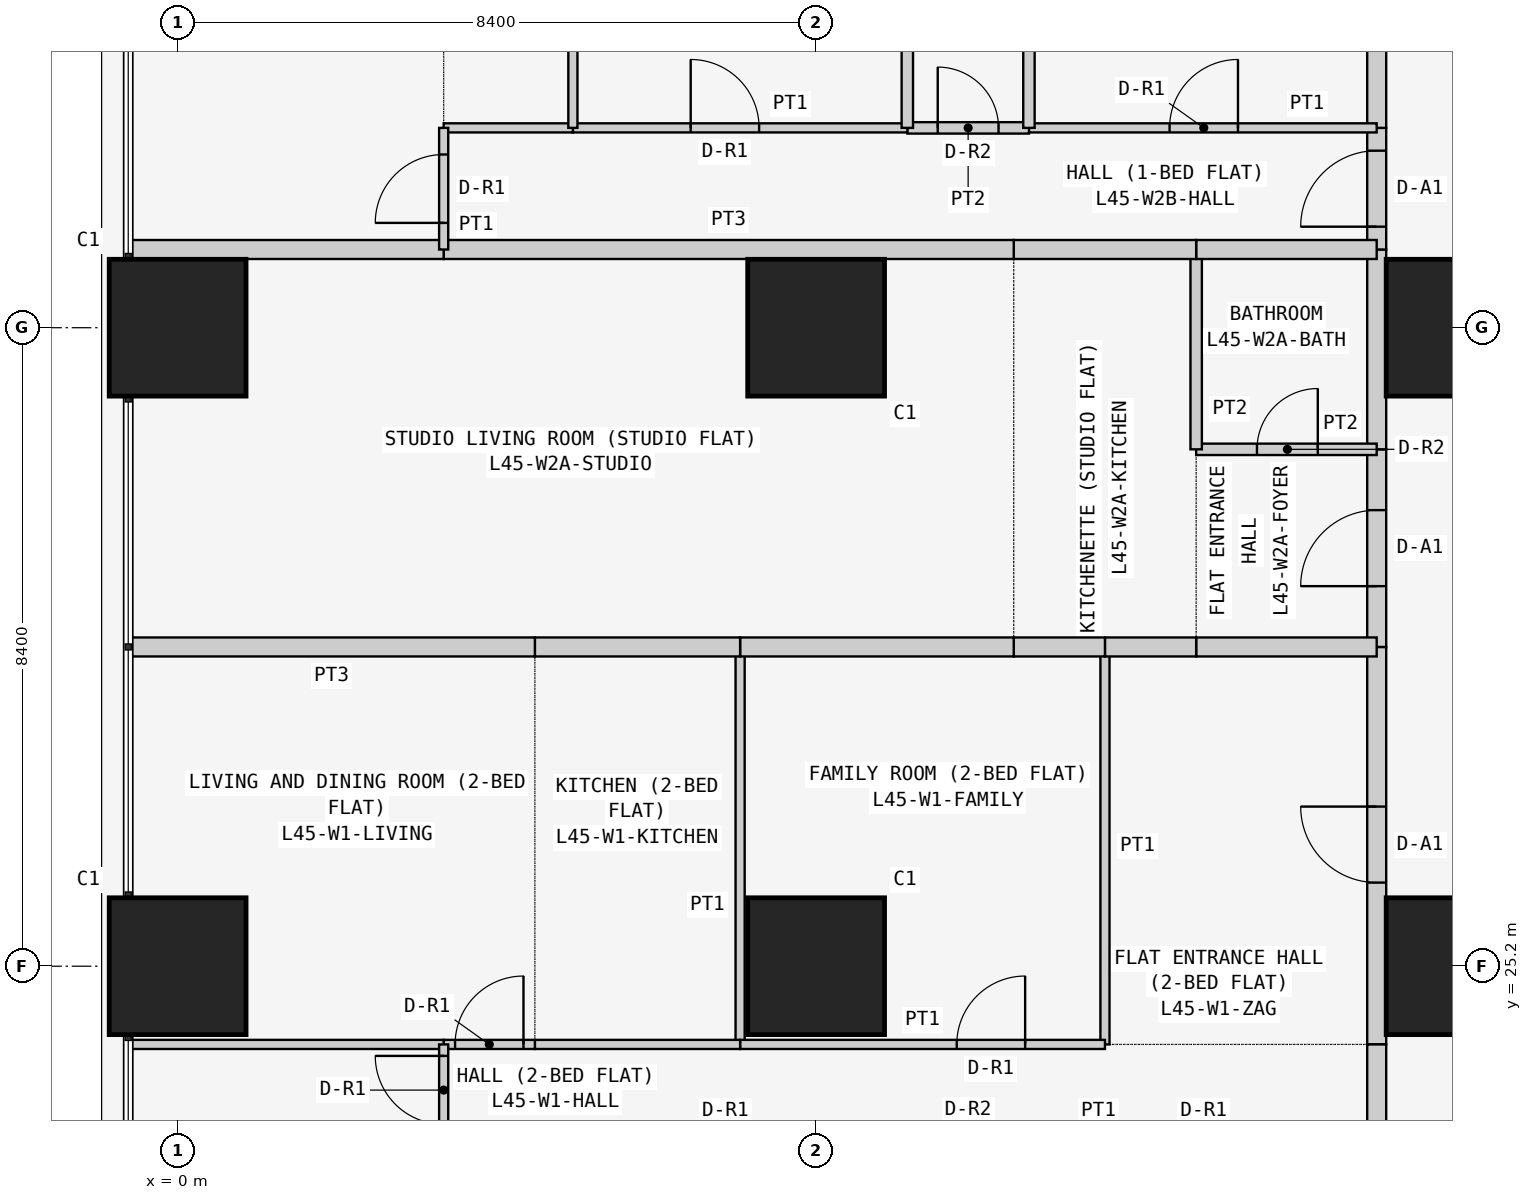
"""IFC4 building model, lengths in metres.
Left out: names, types, materials, properties, quantities, classifications, styles, units other than length and angle.
Written with IfcOpenShell. Run it as: python <this file> out.ifc"""

import sys

from ifc_helpers import new_model, si_unit, direction, frame, frame_2d, origin, origin_2d, place, context, subcontext, project, spatial, rectangle, extrude, element, fill, save


model = new_model("IFC4")
c1 = context("Model", 3, precision=1e-05, world=origin(), true_north=direction((0.0, 1.0)))
c2 = subcontext(c1, "Body", "Model", "MODEL_VIEW")
j1 = project(units=[si_unit("LENGTHUNIT", "METRE"), si_unit("PLANEANGLEUNIT", "RADIAN")], contexts=[c1])
p1 = place(None, origin())
s1 = spatial("IfcSite", under=j1, at=p1, CompositionType="ELEMENT")
p2 = place(p1, origin())
s2 = spatial("IfcBuilding", under=s1, at=p2, CompositionType="ELEMENT")
p3 = place(p2, frame((0.0, 0.0, 173.7)))
s3 = spatial("IfcBuildingStorey", under=s2, at=p3, CompositionType="ELEMENT", Elevation=173.7)
for number, where, z_axis, x_axis in (
    (1, (0.0, 25.2, 0.0), (0.0, 0.0, 1.0), (1.0, 0.0, 0.0)),
    (2, (0.0, 33.6, 0.0), (0.0, 0.0, 1.0), (1.0, 0.0, 0.0)),
    (3, (8.4, 25.2, 0.0), (0.0, 0.0, 1.0), (1.0, 0.0, 0.0)),
    (4, (8.4, 33.6, 0.0), (0.0, 0.0, 1.0), (1.0, 0.0, 0.0)),
    (5, (16.8, 25.2, 0.0), (0.0, 0.0, 1.0), (1.0, 0.0, 0.0)),
    (6, (16.8, 33.6, 0.0), (0.0, 0.0, 1.0), (1.0, 0.0, 0.0)),
):
    element("IfcColumn", number, at=place(p3, frame(where, z_axis=z_axis, x_axis=x_axis)), inside=s3, PredefinedType="COLUMN", context=c2, shape_type="SweptSolid", body=[
        extrude(rectangle(XDim=1.8, YDim=1.8, at=origin_2d()), origin(), (0.0, 0.0, 1.0), 3.6),
    ])
p4 = place(p3, frame((15.775, 24.171, 0.0), z_axis=(0.0, 0.0, 1.0), x_axis=(0.0, 1.0, 0.0)))
e7 = element("IfcWall", 7, at=p4, inside=s3, PredefinedType="PARTITIONING", context=c2, shape_type="SweptSolid", body=[
    extrude(rectangle(XDim=5.229, YDim=0.25, at=frame_2d((2.615, 0.0))), origin(), (0.0, 0.0, 1.0), 3.35),
])
p5 = place(p4, frame((2.129, 0.0, 0.0)))
e8 = element("IfcOpeningElement", 8, at=p5, cuts=e7, PredefinedType="OPENING", context=c2, shape_type="SweptSolid", body=[
    extrude(rectangle(XDim=1.0, YDim=2.1, at=frame_2d((0.5, 1.05))), frame((0.0, 0.135, 0.0), z_axis=(0.0, -1.0, 0.0), x_axis=(1.0, 0.0, 0.0)), (0.0, 0.0, 1.0), 0.27),
])
p6 = place(p3, frame((15.775, 22.971, 0.0), z_axis=(0.0, 0.0, 1.0), x_axis=(0.0, 1.0, 0.0)))
e9 = element("IfcWall", 9, at=p6, inside=s3, PredefinedType="PARTITIONING", context=c2, shape_type="SweptSolid", body=[
    extrude(rectangle(XDim=1.2, YDim=0.25, at=frame_2d((0.6, 0.0))), origin(), (0.0, 0.0, 1.0), 3.35),
])
p7 = place(p3, frame((15.775, 29.4, 0.0), z_axis=(0.0, 0.0, 1.0), x_axis=(0.0, 1.0, 0.0)))
e10 = element("IfcWall", 10, at=p7, inside=s3, PredefinedType="PARTITIONING", context=c2, shape_type="SweptSolid", body=[
    extrude(rectangle(XDim=2.6, YDim=0.25, at=frame_2d((1.3, 0.0))), origin(), (0.0, 0.0, 1.0), 3.35),
])
p8 = place(p7, frame((0.8, 0.0, 0.0)))
e11 = element("IfcOpeningElement", 11, at=p8, cuts=e10, PredefinedType="OPENING", context=c2, shape_type="SweptSolid", body=[
    extrude(rectangle(XDim=1.0, YDim=2.1, at=frame_2d((0.5, 1.05))), frame((0.0, 0.135, 0.0), z_axis=(0.0, -1.0, 0.0), x_axis=(1.0, 0.0, 0.0)), (0.0, 0.0, 1.0), 0.27),
])
p9 = place(p3, frame((15.775, 32.0, 0.0), z_axis=(0.0, 0.0, 1.0), x_axis=(0.0, 1.0, 0.0)))
e12 = element("IfcWall", 12, at=p9, inside=s3, PredefinedType="PARTITIONING", context=c2, shape_type="SweptSolid", body=[
    extrude(rectangle(XDim=2.629, YDim=0.25, at=frame_2d((1.314, 0.0))), origin(), (0.0, 0.0, 1.0), 3.35),
])
p10 = place(p3, frame((15.775, 34.629, 0.0), z_axis=(0.0, 0.0, 1.0), x_axis=(0.0, 1.0, 0.0)))
e13 = element("IfcWall", 13, at=p10, inside=s3, PredefinedType="PARTITIONING", context=c2, shape_type="SweptSolid", body=[
    extrude(rectangle(XDim=1.6, YDim=0.25, at=frame_2d((0.8, 0.0))), origin(), (0.0, 0.0, 1.0), 3.35),
])
p11 = place(p10, frame((0.3, 0.0, 0.0)))
e14 = element("IfcOpeningElement", 14, at=p11, cuts=e13, PredefinedType="OPENING", context=c2, shape_type="SweptSolid", body=[
    extrude(rectangle(XDim=1.0, YDim=2.1, at=frame_2d((0.5, 1.05))), frame((0.0, 0.135, 0.0), z_axis=(0.0, -1.0, 0.0), x_axis=(1.0, 0.0, 0.0)), (0.0, 0.0, 1.0), 0.27),
])
p12 = place(p3, frame((15.775, 36.229, 0.0), z_axis=(0.0, 0.0, 1.0), x_axis=(0.0, 1.0, 0.0)))
e15 = element("IfcWall", 15, at=p12, inside=s3, PredefinedType="PARTITIONING", context=c2, shape_type="SweptSolid", body=[
    extrude(rectangle(XDim=6.471, YDim=0.25, at=frame_2d((3.235, 0.0))), origin(), (0.0, 0.0, 1.0), 3.35),
])
p13 = place(p3, frame((12.2, 29.4, 0.0), z_axis=(0.0, 0.0, 1.0), x_axis=(0.0, -1.0, 0.0)))
e16 = element("IfcWall", 16, at=p13, inside=s3, PredefinedType="PARTITIONING", context=c2, shape_type="SweptSolid", body=[
    extrude(rectangle(XDim=5.229, YDim=0.12, at=frame_2d((2.615, 0.0))), origin(), (0.0, 0.0, 1.0), 3.35),
])
p14 = place(p3, frame((15.775, 29.4, 0.0), z_axis=(0.0, 0.0, 1.0), x_axis=(-1.0, 0.0, 0.0)))
e17 = element("IfcWall", 17, at=p14, inside=s3, PredefinedType="PARTITIONING", context=c2, shape_type="SweptSolid", body=[
    extrude(rectangle(XDim=2.375, YDim=0.25, at=frame_2d((1.188, 0.0))), origin(), (0.0, 0.0, 1.0), 3.35),
])
p15 = place(p3, frame((13.4, 29.4, 0.0), z_axis=(0.0, 0.0, 1.0), x_axis=(-1.0, 0.0, 0.0)))
e18 = element("IfcWall", 18, at=p15, inside=s3, PredefinedType="PARTITIONING", context=c2, shape_type="SweptSolid", body=[
    extrude(rectangle(XDim=1.2, YDim=0.25, at=frame_2d((0.6, 0.0))), origin(), (0.0, 0.0, 1.0), 3.35),
])
p16 = place(p3, frame((7.4, 29.4, 0.0), z_axis=(0.0, 0.0, 1.0), x_axis=(0.0, -1.0, 0.0)))
e19 = element("IfcWall", 19, at=p16, inside=s3, PredefinedType="PARTITIONING", context=c2, shape_type="SweptSolid", body=[
    extrude(rectangle(XDim=5.229, YDim=0.12, at=frame_2d((2.615, 0.0))), origin(), (0.0, 0.0, 1.0), 3.35),
])
p17 = place(p3, frame((7.4, 24.171, 0.0), z_axis=(0.0, 0.0, 1.0), x_axis=(1.0, 0.0, 0.0)))
e20 = element("IfcWall", 20, at=p17, inside=s3, PredefinedType="PARTITIONING", context=c2, shape_type="SweptSolid", body=[
    extrude(rectangle(XDim=4.8, YDim=0.12, at=frame_2d((2.4, 0.0))), origin(), (0.0, 0.0, 1.0), 3.35),
])
p18 = place(p17, frame((2.85, 0.0, 0.0)))
e21 = element("IfcOpeningElement", 21, at=p18, cuts=e20, PredefinedType="OPENING", context=c2, shape_type="SweptSolid", body=[
    extrude(rectangle(XDim=0.9, YDim=2.1, at=frame_2d((0.45, 1.05))), frame((0.0, 0.07, 0.0), z_axis=(0.0, -1.0, 0.0), x_axis=(1.0, 0.0, 0.0)), (0.0, 0.0, 1.0), 0.14),
])
p19 = place(p3, frame((12.2, 29.4, 0.0), z_axis=(0.0, 0.0, 1.0), x_axis=(-1.0, 0.0, 0.0)))
e22 = element("IfcWall", 22, at=p19, inside=s3, PredefinedType="PARTITIONING", context=c2, shape_type="SweptSolid", body=[
    extrude(rectangle(XDim=1.2, YDim=0.25, at=frame_2d((0.6, 0.0))), origin(), (0.0, 0.0, 1.0), 3.35),
])
p20 = place(p3, frame((11.0, 29.4, 0.0), z_axis=(0.0, 0.0, 1.0), x_axis=(-1.0, 0.0, 0.0)))
e23 = element("IfcWall", 23, at=p20, inside=s3, PredefinedType="PARTITIONING", context=c2, shape_type="SweptSolid", body=[
    extrude(rectangle(XDim=3.6, YDim=0.25, at=frame_2d((1.8, 0.0))), origin(), (0.0, 0.0, 1.0), 3.35),
])
p21 = place(p3, frame((4.7, 24.171, 0.0), z_axis=(0.0, 0.0, 1.0), x_axis=(1.0, 0.0, 0.0)))
e24 = element("IfcWall", 24, at=p21, inside=s3, PredefinedType="PARTITIONING", context=c2, shape_type="SweptSolid", body=[
    extrude(rectangle(XDim=2.7, YDim=0.12, at=frame_2d((1.35, 0.0))), origin(), (0.0, 0.0, 1.0), 3.35),
])
p22 = place(p3, frame((7.4, 29.4, 0.0), z_axis=(0.0, 0.0, 1.0), x_axis=(-1.0, 0.0, 0.0)))
e25 = element("IfcWall", 25, at=p22, inside=s3, PredefinedType="PARTITIONING", context=c2, shape_type="SweptSolid", body=[
    extrude(rectangle(XDim=2.7, YDim=0.25, at=frame_2d((1.35, 0.0))), origin(), (0.0, 0.0, 1.0), 3.35),
])
p23 = place(p3, frame((3.5, 24.171, 0.0), z_axis=(0.0, 0.0, 1.0), x_axis=(1.0, 0.0, 0.0)))
e26 = element("IfcWall", 26, at=p23, inside=s3, PredefinedType="PARTITIONING", context=c2, shape_type="SweptSolid", body=[
    extrude(rectangle(XDim=1.2, YDim=0.12, at=frame_2d((0.6, 0.0))), origin(), (0.0, 0.0, 1.0), 3.35),
])
p24 = place(p23, frame((0.15, 0.0, 0.0)))
e27 = element("IfcOpeningElement", 27, at=p24, cuts=e26, PredefinedType="OPENING", context=c2, shape_type="SweptSolid", body=[
    extrude(rectangle(XDim=0.9, YDim=2.1, at=frame_2d((0.45, 1.05))), frame((0.0, 0.07, 0.0), z_axis=(0.0, -1.0, 0.0), x_axis=(1.0, 0.0, 0.0)), (0.0, 0.0, 1.0), 0.14),
])
p25 = place(p3, frame((-0.65, 24.171, 0.0), z_axis=(0.0, 0.0, 1.0), x_axis=(1.0, 0.0, 0.0)))
e28 = element("IfcWall", 28, at=p25, inside=s3, PredefinedType="PARTITIONING", context=c2, shape_type="SweptSolid", body=[
    extrude(rectangle(XDim=4.15, YDim=0.12, at=frame_2d((2.075, 0.0))), origin(), (0.0, 0.0, 1.0), 3.35),
])
p26 = place(p3, frame((4.7, 29.4, 0.0), z_axis=(0.0, 0.0, 1.0), x_axis=(-1.0, 0.0, 0.0)))
e29 = element("IfcWall", 29, at=p26, inside=s3, PredefinedType="PARTITIONING", context=c2, shape_type="SweptSolid", body=[
    extrude(rectangle(XDim=5.35, YDim=0.25, at=frame_2d((2.675, 0.0))), origin(), (0.0, 0.0, 1.0), 3.35),
])
p27 = place(p3, frame((3.5, 24.171, 0.0), z_axis=(0.0, 0.0, 1.0), x_axis=(0.0, -1.0, 0.0)))
e30 = element("IfcWall", 30, at=p27, inside=s3, PredefinedType="PARTITIONING", context=c2, shape_type="SweptSolid", body=[
    extrude(rectangle(XDim=1.2, YDim=0.12, at=frame_2d((0.6, 0.0))), origin(), (0.0, 0.0, 1.0), 3.35),
])
p28 = place(p27, frame((0.151, 0.0, 0.0)))
e31 = element("IfcOpeningElement", 31, at=p28, cuts=e30, PredefinedType="OPENING", context=c2, shape_type="SweptSolid", body=[
    extrude(rectangle(XDim=0.9, YDim=2.1, at=frame_2d((0.45, 1.05))), frame((0.0, 0.07, 0.0), z_axis=(0.0, -1.0, 0.0), x_axis=(1.0, 0.0, 0.0)), (0.0, 0.0, 1.0), 0.14),
])
p29 = place(p3, frame((13.4, 32.0, 0.0), z_axis=(0.0, 0.0, 1.0), x_axis=(1.0, 0.0, 0.0)))
e32 = element("IfcWall", 32, at=p29, inside=s3, PredefinedType="PARTITIONING", context=c2, shape_type="SweptSolid", body=[
    extrude(rectangle(XDim=2.375, YDim=0.15, at=frame_2d((1.188, 0.0))), origin(), (0.0, 0.0, 1.0), 3.35),
])
p30 = place(p29, frame((0.8, 0.0, 0.0)))
e33 = element("IfcOpeningElement", 33, at=p30, cuts=e32, PredefinedType="OPENING", context=c2, shape_type="SweptSolid", body=[
    extrude(rectangle(XDim=0.8, YDim=2.1, at=frame_2d((0.4, 1.05))), frame((0.0, 0.085, 0.0), z_axis=(0.0, -1.0, 0.0), x_axis=(1.0, 0.0, 0.0)), (0.0, 0.0, 1.0), 0.17),
])
p31 = place(p3, frame((13.4, 32.0, 0.0), z_axis=(0.0, 0.0, 1.0), x_axis=(0.0, 1.0, 0.0)))
e34 = element("IfcWall", 34, at=p31, inside=s3, PredefinedType="PARTITIONING", context=c2, shape_type="SweptSolid", body=[
    extrude(rectangle(XDim=2.629, YDim=0.15, at=frame_2d((1.314, 0.0))), origin(), (0.0, 0.0, 1.0), 3.35),
])
p32 = place(p3, frame((13.4, 34.629, 0.0), z_axis=(0.0, 0.0, 1.0), x_axis=(1.0, 0.0, 0.0)))
e35 = element("IfcWall", 35, at=p32, inside=s3, PredefinedType="PARTITIONING", context=c2, shape_type="SweptSolid", body=[
    extrude(rectangle(XDim=2.375, YDim=0.25, at=frame_2d((1.188, 0.0))), origin(), (0.0, 0.0, 1.0), 3.35),
])
p33 = place(p3, frame((11.0, 34.629, 0.0), z_axis=(0.0, 0.0, 1.0), x_axis=(1.0, 0.0, 0.0)))
e36 = element("IfcWall", 36, at=p33, inside=s3, PredefinedType="PARTITIONING", context=c2, shape_type="SweptSolid", body=[
    extrude(rectangle(XDim=2.4, YDim=0.25, at=frame_2d((1.2, 0.0))), origin(), (0.0, 0.0, 1.0), 3.35),
])
p34 = place(p3, frame((3.5, 34.629, 0.0), z_axis=(0.0, 0.0, 1.0), x_axis=(1.0, 0.0, 0.0)))
e37 = element("IfcWall", 37, at=p34, inside=s3, PredefinedType="PARTITIONING", context=c2, shape_type="SweptSolid", body=[
    extrude(rectangle(XDim=7.5, YDim=0.25, at=frame_2d((3.75, 0.0))), origin(), (0.0, 0.0, 1.0), 3.35),
])
p35 = place(p3, frame((-0.65, 34.629, 0.0), z_axis=(0.0, 0.0, 1.0), x_axis=(1.0, 0.0, 0.0)))
e38 = element("IfcWall", 38, at=p35, inside=s3, PredefinedType="PARTITIONING", context=c2, shape_type="SweptSolid", body=[
    extrude(rectangle(XDim=4.15, YDim=0.25, at=frame_2d((2.075, 0.0))), origin(), (0.0, 0.0, 1.0), 3.35),
])
p36 = place(p3, frame((11.2, 36.229, 0.0), z_axis=(0.0, 0.0, 1.0), x_axis=(1.0, 0.0, 0.0)))
e39 = element("IfcWall", 39, at=p36, inside=s3, PredefinedType="PARTITIONING", context=c2, shape_type="SweptSolid", body=[
    extrude(rectangle(XDim=4.575, YDim=0.12, at=frame_2d((2.288, 0.0))), origin(), (0.0, 0.0, 1.0), 3.35),
])
p37 = place(p36, frame((1.85, 0.0, 0.0)))
e40 = element("IfcOpeningElement", 40, at=p37, cuts=e39, PredefinedType="OPENING", context=c2, shape_type="SweptSolid", body=[
    extrude(rectangle(XDim=0.9, YDim=2.1, at=frame_2d((0.45, 1.05))), frame((0.0, 0.07, 0.0), z_axis=(0.0, -1.0, 0.0), x_axis=(1.0, 0.0, 0.0)), (0.0, 0.0, 1.0), 0.14),
])
p38 = place(p3, frame((9.6, 36.229, 0.0), z_axis=(0.0, 0.0, 1.0), x_axis=(1.0, 0.0, 0.0)))
e41 = element("IfcWall", 41, at=p38, inside=s3, PredefinedType="PARTITIONING", context=c2, shape_type="SweptSolid", body=[
    extrude(rectangle(XDim=1.6, YDim=0.15, at=frame_2d((0.8, 0.0))), origin(), (0.0, 0.0, 1.0), 3.35),
])
p39 = place(p38, frame((0.4, 0.0, 0.0)))
e42 = element("IfcOpeningElement", 42, at=p39, cuts=e41, PredefinedType="OPENING", context=c2, shape_type="SweptSolid", body=[
    extrude(rectangle(XDim=0.8, YDim=2.1, at=frame_2d((0.4, 1.05))), frame((0.0, 0.085, 0.0), z_axis=(0.0, -1.0, 0.0), x_axis=(1.0, 0.0, 0.0)), (0.0, 0.0, 1.0), 0.17),
])
p40 = place(p3, frame((5.2, 36.229, 0.0), z_axis=(0.0, 0.0, 1.0), x_axis=(1.0, 0.0, 0.0)))
e43 = element("IfcWall", 43, at=p40, inside=s3, PredefinedType="PARTITIONING", context=c2, shape_type="SweptSolid", body=[
    extrude(rectangle(XDim=4.4, YDim=0.12, at=frame_2d((2.2, 0.0))), origin(), (0.0, 0.0, 1.0), 3.35),
])
p41 = place(p40, frame((1.55, 0.0, 0.0)))
e44 = element("IfcOpeningElement", 44, at=p41, cuts=e43, PredefinedType="OPENING", context=c2, shape_type="SweptSolid", body=[
    extrude(rectangle(XDim=0.9, YDim=2.1, at=frame_2d((0.45, 1.05))), frame((0.0, 0.07, 0.0), z_axis=(0.0, -1.0, 0.0), x_axis=(1.0, 0.0, 0.0)), (0.0, 0.0, 1.0), 0.14),
])
p42 = place(p3, frame((3.5, 36.229, 0.0), z_axis=(0.0, 0.0, 1.0), x_axis=(1.0, 0.0, 0.0)))
e45 = element("IfcWall", 45, at=p42, inside=s3, PredefinedType="PARTITIONING", context=c2, shape_type="SweptSolid", body=[
    extrude(rectangle(XDim=1.7, YDim=0.12, at=frame_2d((0.85, 0.0))), origin(), (0.0, 0.0, 1.0), 3.35),
])
p43 = place(p3, frame((3.5, 34.629, 0.0), z_axis=(0.0, 0.0, 1.0), x_axis=(0.0, 1.0, 0.0)))
e46 = element("IfcWall", 46, at=p43, inside=s3, PredefinedType="PARTITIONING", context=c2, shape_type="SweptSolid", body=[
    extrude(rectangle(XDim=1.6, YDim=0.12, at=frame_2d((0.8, 0.0))), origin(), (0.0, 0.0, 1.0), 3.35),
])
p44 = place(p43, frame((0.35, 0.0, 0.0)))
e47 = element("IfcOpeningElement", 47, at=p44, cuts=e46, PredefinedType="OPENING", context=c2, shape_type="SweptSolid", body=[
    extrude(rectangle(XDim=0.9, YDim=2.1, at=frame_2d((0.45, 1.05))), frame((0.0, 0.07, 0.0), z_axis=(0.0, -1.0, 0.0), x_axis=(1.0, 0.0, 0.0)), (0.0, 0.0, 1.0), 0.14),
])
for number, where, z_axis, x_axis in (
    (48, (11.2, 36.229, 0.0), (0.0, 0.0, 1.0), (0.0, 1.0, 0.0)),
    (49, (9.6, 36.229, 0.0), (0.0, 0.0, 1.0), (0.0, 1.0, 0.0)),
):
    element("IfcWall", number, at=place(p3, frame(where, z_axis=z_axis, x_axis=x_axis)), inside=s3, PredefinedType="PARTITIONING", context=c2, shape_type="SweptSolid", body=[
        extrude(rectangle(XDim=6.471, YDim=0.15, at=frame_2d((3.235, 0.0))), origin(), (0.0, 0.0, 1.0), 3.35),
    ])
p45 = place(p3, frame((5.2, 36.229, 0.0), z_axis=(0.0, 0.0, 1.0), x_axis=(0.0, 1.0, 0.0)))
e50 = element("IfcWall", 50, at=p45, inside=s3, PredefinedType="PARTITIONING", context=c2, shape_type="SweptSolid", body=[
    extrude(rectangle(XDim=6.471, YDim=0.12, at=frame_2d((3.235, 0.0))), origin(), (0.0, 0.0, 1.0), 3.35),
])
p46 = place(p5, origin())
e51 = element("IfcDoor", 51, at=p46, inside=s3, OperationType="SINGLE_SWING_RIGHT", PredefinedType="DOOR", context=c2, shape_type="SweptSolid", body=[
    extrude(rectangle(XDim=1.0, YDim=2.1, at=frame_2d((0.5, 1.05))), frame((0.0, 0.025, 0.0), z_axis=(0.0, -1.0, 0.0), x_axis=(1.0, 0.0, 0.0)), (0.0, 0.0, 1.0), 0.05),
])
fill(e8, e51)
p47 = place(p18, origin())
e52 = element("IfcDoor", 52, at=p47, inside=s3, OperationType="SINGLE_SWING_RIGHT", PredefinedType="DOOR", context=c2, shape_type="SweptSolid", body=[
    extrude(rectangle(XDim=0.9, YDim=2.1, at=frame_2d((0.45, 1.05))), frame((0.0, 0.025, 0.0), z_axis=(0.0, -1.0, 0.0), x_axis=(1.0, 0.0, 0.0)), (0.0, 0.0, 1.0), 0.05),
])
fill(e21, e52)
p48 = place(p24, origin())
e53 = element("IfcDoor", 53, at=p48, inside=s3, OperationType="SINGLE_SWING_RIGHT", PredefinedType="DOOR", context=c2, shape_type="SweptSolid", body=[
    extrude(rectangle(XDim=0.9, YDim=2.1, at=frame_2d((0.45, 1.05))), frame((0.0, 0.025, 0.0), z_axis=(0.0, -1.0, 0.0), x_axis=(1.0, 0.0, 0.0)), (0.0, 0.0, 1.0), 0.05),
])
fill(e27, e53)
p49 = place(p28, frame((0.9, 0.0, 0.0), z_axis=(0.0, 0.0, 1.0), x_axis=(-1.0, 0.0, 0.0)))
e54 = element("IfcDoor", 54, at=p49, inside=s3, OperationType="SINGLE_SWING_RIGHT", PredefinedType="DOOR", context=c2, shape_type="SweptSolid", body=[
    extrude(rectangle(XDim=0.9, YDim=2.1, at=frame_2d((0.45, 1.05))), frame((0.0, 0.025, 0.0), z_axis=(0.0, -1.0, 0.0), x_axis=(1.0, 0.0, 0.0)), (0.0, 0.0, 1.0), 0.05),
])
fill(e31, e54)
p50 = place(p8, origin())
e55 = element("IfcDoor", 55, at=p50, inside=s3, OperationType="SINGLE_SWING_LEFT", PredefinedType="DOOR", context=c2, shape_type="SweptSolid", body=[
    extrude(rectangle(XDim=1.0, YDim=2.1, at=frame_2d((0.5, 1.05))), frame((0.0, 0.025, 0.0), z_axis=(0.0, -1.0, 0.0), x_axis=(1.0, 0.0, 0.0)), (0.0, 0.0, 1.0), 0.05),
])
fill(e11, e55)
p51 = place(p30, origin())
e56 = element("IfcDoor", 56, at=p51, inside=s3, OperationType="SINGLE_SWING_RIGHT", PredefinedType="DOOR", context=c2, shape_type="SweptSolid", body=[
    extrude(rectangle(XDim=0.8, YDim=2.1, at=frame_2d((0.4, 1.05))), frame((0.0, 0.025, 0.0), z_axis=(0.0, -1.0, 0.0), x_axis=(1.0, 0.0, 0.0)), (0.0, 0.0, 1.0), 0.05),
])
fill(e33, e56)
p52 = place(p11, origin())
e57 = element("IfcDoor", 57, at=p52, inside=s3, OperationType="SINGLE_SWING_LEFT", PredefinedType="DOOR", context=c2, shape_type="SweptSolid", body=[
    extrude(rectangle(XDim=1.0, YDim=2.1, at=frame_2d((0.5, 1.05))), frame((0.0, 0.025, 0.0), z_axis=(0.0, -1.0, 0.0), x_axis=(1.0, 0.0, 0.0)), (0.0, 0.0, 1.0), 0.05),
])
fill(e14, e57)
p53 = place(p37, origin())
e58 = element("IfcDoor", 58, at=p53, inside=s3, OperationType="SINGLE_SWING_RIGHT", PredefinedType="DOOR", context=c2, shape_type="SweptSolid", body=[
    extrude(rectangle(XDim=0.9, YDim=2.1, at=frame_2d((0.45, 1.05))), frame((0.0, 0.025, 0.0), z_axis=(0.0, -1.0, 0.0), x_axis=(1.0, 0.0, 0.0)), (0.0, 0.0, 1.0), 0.05),
])
fill(e40, e58)
p54 = place(p39, origin())
e59 = element("IfcDoor", 59, at=p54, inside=s3, OperationType="SINGLE_SWING_LEFT", PredefinedType="DOOR", context=c2, shape_type="SweptSolid", body=[
    extrude(rectangle(XDim=0.8, YDim=2.1, at=frame_2d((0.4, 1.05))), frame((0.0, 0.025, 0.0), z_axis=(0.0, -1.0, 0.0), x_axis=(1.0, 0.0, 0.0)), (0.0, 0.0, 1.0), 0.05),
])
fill(e42, e59)
p55 = place(p41, origin())
e60 = element("IfcDoor", 60, at=p55, inside=s3, OperationType="SINGLE_SWING_LEFT", PredefinedType="DOOR", context=c2, shape_type="SweptSolid", body=[
    extrude(rectangle(XDim=0.9, YDim=2.1, at=frame_2d((0.45, 1.05))), frame((0.0, 0.025, 0.0), z_axis=(0.0, -1.0, 0.0), x_axis=(1.0, 0.0, 0.0)), (0.0, 0.0, 1.0), 0.05),
])
fill(e44, e60)
p56 = place(p44, origin())
e61 = element("IfcDoor", 61, at=p56, inside=s3, OperationType="SINGLE_SWING_LEFT", PredefinedType="DOOR", context=c2, shape_type="SweptSolid", body=[
    extrude(rectangle(XDim=0.9, YDim=2.1, at=frame_2d((0.45, 1.05))), frame((0.0, 0.025, 0.0), z_axis=(0.0, -1.0, 0.0), x_axis=(1.0, 0.0, 0.0)), (0.0, 0.0, 1.0), 0.05),
])
fill(e47, e61)
save(model, sys.argv[1])
